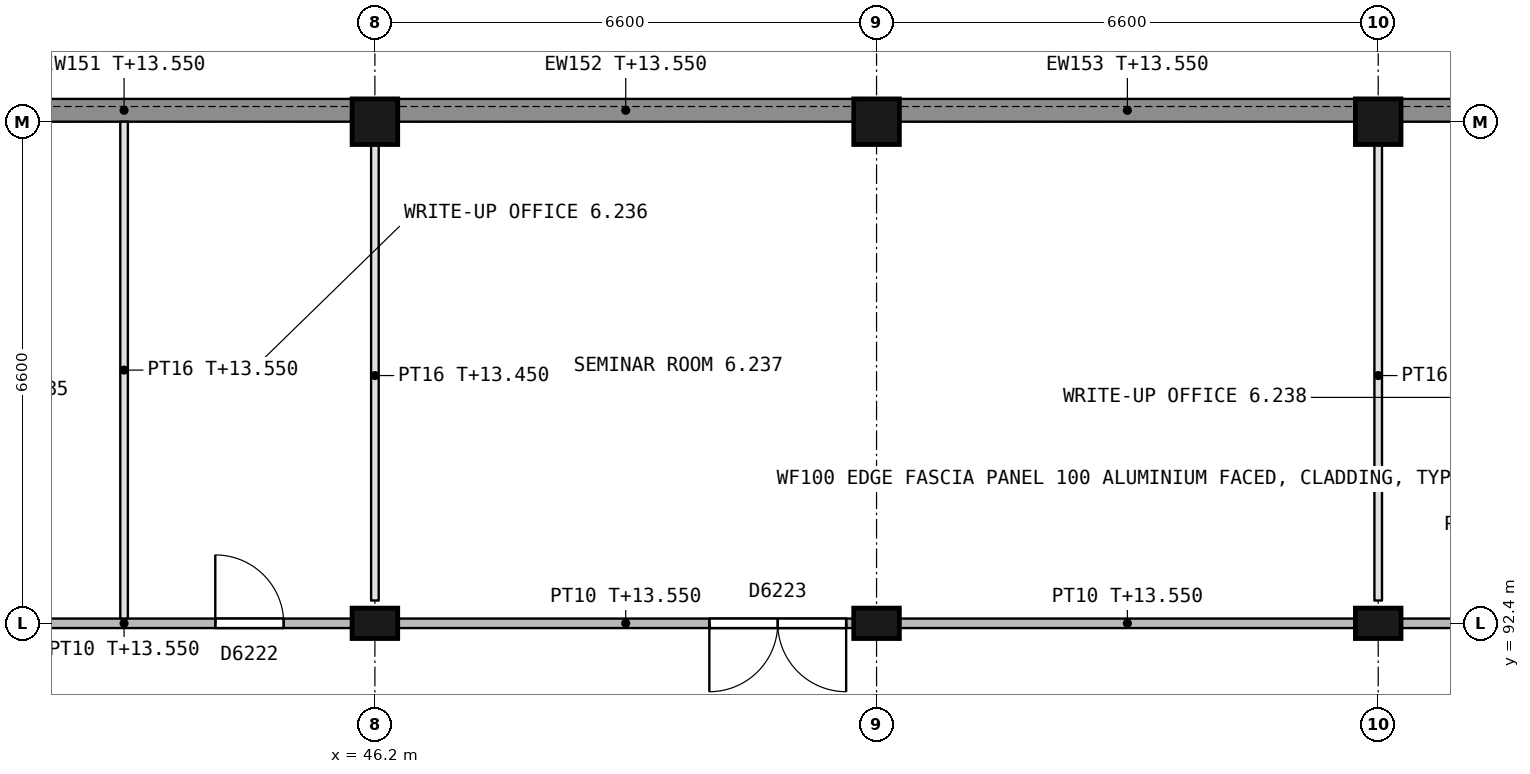
"""IFC4 building model, lengths in metres.
Left out: names, types, materials, properties, quantities, classifications, styles, units other than length and angle.
Written with IfcOpenShell. Run it as: python <this file> out.ifc"""

import sys

from ifc_helpers import new_model, si_unit, direction, frame, frame_2d, origin, origin_2d, place, context, subcontext, project, spatial, rectangle, extrude, element, fill, save


model = new_model("IFC4")
c1 = context("Model", 3, precision=1e-05, world=origin(), true_north=direction((0.0, 1.0)))
c2 = subcontext(c1, "Body", "Model", "MODEL_VIEW")
j1 = project(units=[si_unit("LENGTHUNIT", "METRE"), si_unit("PLANEANGLEUNIT", "RADIAN")], contexts=[c1])
p1 = place(None, origin())
s1 = spatial("IfcSite", under=j1, at=p1, CompositionType="ELEMENT")
p2 = place(p1, origin())
s2 = spatial("IfcBuilding", under=s1, at=p2, CompositionType="ELEMENT")
p3 = place(p2, frame((0.0, 0.0, 9.9)))
s3 = spatial("IfcBuildingStorey", under=s2, at=p3, CompositionType="ELEMENT", Elevation=9.9)
p4 = place(p3, frame((46.2, 92.4, 0.0), z_axis=(0.0, 0.0, 1.0), x_axis=(1.0, 0.0, 0.0)))
e1 = element("IfcColumn", 1, at=p4, inside=s3, PredefinedType="COLUMN", context=c2, shape_type="SweptSolid", body=[
    extrude(rectangle(XDim=0.6, YDim=0.4, at=origin_2d()), origin(), (0.0, 0.0, 1.0), 4.5),
])
p5 = place(p3, frame((46.2, 99.0, 0.0), z_axis=(0.0, 0.0, 1.0), x_axis=(1.0, 0.0, 0.0)))
e2 = element("IfcColumn", 2, at=p5, inside=s3, PredefinedType="COLUMN", context=c2, shape_type="SweptSolid", body=[
    extrude(rectangle(XDim=0.6, YDim=0.6, at=origin_2d()), origin(), (0.0, 0.0, 1.0), 4.5),
])
p6 = place(p3, frame((52.8, 92.4, 0.0), z_axis=(0.0, 0.0, 1.0), x_axis=(1.0, 0.0, 0.0)))
e3 = element("IfcColumn", 3, at=p6, inside=s3, PredefinedType="COLUMN", context=c2, shape_type="SweptSolid", body=[
    extrude(rectangle(XDim=0.6, YDim=0.4, at=origin_2d()), origin(), (0.0, 0.0, 1.0), 4.5),
])
p7 = place(p3, frame((52.8, 99.0, 0.0), z_axis=(0.0, 0.0, 1.0), x_axis=(1.0, 0.0, 0.0)))
e4 = element("IfcColumn", 4, at=p7, inside=s3, PredefinedType="COLUMN", context=c2, shape_type="SweptSolid", body=[
    extrude(rectangle(XDim=0.6, YDim=0.6, at=origin_2d()), origin(), (0.0, 0.0, 1.0), 4.5),
])
p8 = place(p3, frame((59.4, 92.4, 0.0), z_axis=(0.0, 0.0, 1.0), x_axis=(1.0, 0.0, 0.0)))
e5 = element("IfcColumn", 5, at=p8, inside=s3, PredefinedType="COLUMN", context=c2, shape_type="SweptSolid", body=[
    extrude(rectangle(XDim=0.6, YDim=0.4, at=origin_2d()), origin(), (0.0, 0.0, 1.0), 4.5),
])
p9 = place(p3, frame((59.4, 99.0, 0.0), z_axis=(0.0, 0.0, 1.0), x_axis=(1.0, 0.0, 0.0)))
e6 = element("IfcColumn", 6, at=p9, inside=s3, PredefinedType="COLUMN", context=c2, shape_type="SweptSolid", body=[
    extrude(rectangle(XDim=0.6, YDim=0.6, at=origin_2d()), origin(), (0.0, 0.0, 1.0), 4.5),
])
for number, where, z_axis, x_axis in (
    (7, (39.9, 99.15, 0.0), (0.0, 0.0, 1.0), (1.0, 0.0, 0.0)),
    (8, (46.5, 99.15, 0.0), (0.0, 0.0, 1.0), (1.0, 0.0, 0.0)),
    (9, (53.1, 99.15, 0.0), (0.0, 0.0, 1.0), (1.0, 0.0, 0.0)),
    (10, (59.7, 99.15, 0.0), (0.0, 0.0, 1.0), (1.0, 0.0, 0.0)),
):
    element("IfcWall", number, at=place(p3, frame(where, z_axis=z_axis, x_axis=x_axis)), inside=s3, PredefinedType="STANDARD", context=c2, shape_type="SweptSolid", body=[
        extrude(rectangle(XDim=6.0, YDim=0.3, at=frame_2d((3.0, 0.0))), origin(), (0.0, 0.0, 1.0), 3.65),
    ])
p10 = place(p3, frame((39.9, 92.4, 0.0), z_axis=(0.0, 0.0, 1.0), x_axis=(1.0, 0.0, 0.0)))
e11 = element("IfcWall", 11, at=p10, inside=s3, PredefinedType="PARTITIONING", context=c2, shape_type="SweptSolid", body=[
    extrude(rectangle(XDim=6.0, YDim=0.125, at=frame_2d((3.0, 0.0))), origin(), (0.0, 0.0, 1.0), 3.65),
])
p11 = place(p10, frame((0.9, 0.0, 0.0)))
e12 = element("IfcOpeningElement", 12, at=p11, cuts=e11, PredefinedType="OPENING", context=c2, shape_type="SweptSolid", body=[
    extrude(rectangle(XDim=0.9, YDim=2.1, at=frame_2d((0.45, 1.05))), frame((0.0, 0.073, 0.0), z_axis=(0.0, -1.0, 0.0), x_axis=(1.0, 0.0, 0.0)), (0.0, 0.0, 1.0), 0.145),
])
p12 = place(p10, frame((4.2, 0.0, 0.0)))
e13 = element("IfcOpeningElement", 13, at=p12, cuts=e11, PredefinedType="OPENING", context=c2, shape_type="SweptSolid", body=[
    extrude(rectangle(XDim=0.9, YDim=2.1, at=frame_2d((0.45, 1.05))), frame((0.0, 0.073, 0.0), z_axis=(0.0, -1.0, 0.0), x_axis=(1.0, 0.0, 0.0)), (0.0, 0.0, 1.0), 0.145),
])
p13 = place(p3, frame((52.5, 92.4, 0.0), z_axis=(0.0, 0.0, 1.0), x_axis=(-1.0, 0.0, 0.0)))
e14 = element("IfcWall", 14, at=p13, inside=s3, PredefinedType="PARTITIONING", context=c2, shape_type="SweptSolid", body=[
    extrude(rectangle(XDim=6.0, YDim=0.125, at=frame_2d((3.0, 0.0))), origin(), (0.0, 0.0, 1.0), 3.65),
])
p14 = place(p13, frame((0.1, 0.0, 0.0)))
e15 = element("IfcOpeningElement", 15, at=p14, cuts=e14, PredefinedType="OPENING", context=c2, shape_type="SweptSolid", body=[
    extrude(rectangle(XDim=1.8, YDim=2.1, at=frame_2d((0.9, 1.05))), frame((0.0, 0.073, 0.0), z_axis=(0.0, -1.0, 0.0), x_axis=(1.0, 0.0, 0.0)), (0.0, 0.0, 1.0), 0.145),
])
p15 = place(p3, frame((53.1, 92.4, 0.0), z_axis=(0.0, 0.0, 1.0), x_axis=(1.0, 0.0, 0.0)))
e16 = element("IfcWall", 16, at=p15, inside=s3, PredefinedType="PARTITIONING", context=c2, shape_type="SweptSolid", body=[
    extrude(rectangle(XDim=6.0, YDim=0.125, at=frame_2d((3.0, 0.0))), origin(), (0.0, 0.0, 1.0), 3.65),
])
p16 = place(p3, frame((59.7, 92.4, 0.0), z_axis=(0.0, 0.0, 1.0), x_axis=(1.0, 0.0, 0.0)))
e17 = element("IfcWall", 17, at=p16, inside=s3, PredefinedType="PARTITIONING", context=c2, shape_type="SweptSolid", body=[
    extrude(rectangle(XDim=3.038, YDim=0.125, at=frame_2d((1.519, 0.0))), origin(), (0.0, 0.0, 1.0), 3.65),
])
p17 = place(p16, frame((0.9, 0.0, 0.0)))
e18 = element("IfcOpeningElement", 18, at=p17, cuts=e17, PredefinedType="OPENING", context=c2, shape_type="SweptSolid", body=[
    extrude(rectangle(XDim=0.9, YDim=2.1, at=frame_2d((0.45, 1.05))), frame((0.0, 0.073, 0.0), z_axis=(0.0, -1.0, 0.0), x_axis=(1.0, 0.0, 0.0)), (0.0, 0.0, 1.0), 0.145),
])
p18 = place(p3, frame((42.9, 92.463, 0.0), z_axis=(0.0, 0.0, 1.0), x_axis=(0.0, 1.0, 0.0)))
e19 = element("IfcWall", 19, at=p18, inside=s3, PredefinedType="PARTITIONING", context=c2, shape_type="SweptSolid", body=[
    extrude(rectangle(XDim=6.537, YDim=0.1, at=frame_2d((3.269, 0.0))), origin(), (0.0, 0.0, 1.0), 3.65),
])
for number, where, z_axis, x_axis in (
    (20, (46.2, 92.7, 0.0), (0.0, 0.0, 1.0), (0.0, 1.0, 0.0)),
    (21, (59.4, 92.7, 0.0), (0.0, 0.0, 1.0), (0.0, 1.0, 0.0)),
):
    element("IfcWall", number, at=place(p3, frame(where, z_axis=z_axis, x_axis=x_axis)), inside=s3, PredefinedType="PARTITIONING", context=c2, shape_type="SweptSolid", body=[
        extrude(rectangle(XDim=6.0, YDim=0.1, at=frame_2d((3.0, 0.0))), origin(), (0.0, 0.0, 1.0), 3.55),
    ])
p19 = place(p12, origin())
e22 = element("IfcDoor", 22, at=p19, inside=s3, OperationType="SINGLE_SWING_LEFT", PredefinedType="DOOR", context=c2, shape_type="SweptSolid", body=[
    extrude(rectangle(XDim=0.9, YDim=2.1, at=frame_2d((0.45, 1.05))), frame((0.0, 0.025, 0.0), z_axis=(0.0, -1.0, 0.0), x_axis=(1.0, 0.0, 0.0)), (0.0, 0.0, 1.0), 0.05),
])
fill(e13, e22)
p20 = place(p14, origin())
e23 = element("IfcDoor", 23, at=p20, inside=s3, OperationType="DOUBLE_DOOR_SINGLE_SWING", PredefinedType="DOOR", context=c2, shape_type="SweptSolid", body=[
    extrude(rectangle(XDim=1.8, YDim=2.1, at=frame_2d((0.9, 1.05))), frame((0.0, 0.025, 0.0), z_axis=(0.0, -1.0, 0.0), x_axis=(1.0, 0.0, 0.0)), (0.0, 0.0, 1.0), 0.05),
])
fill(e15, e23)
save(model, sys.argv[1])
